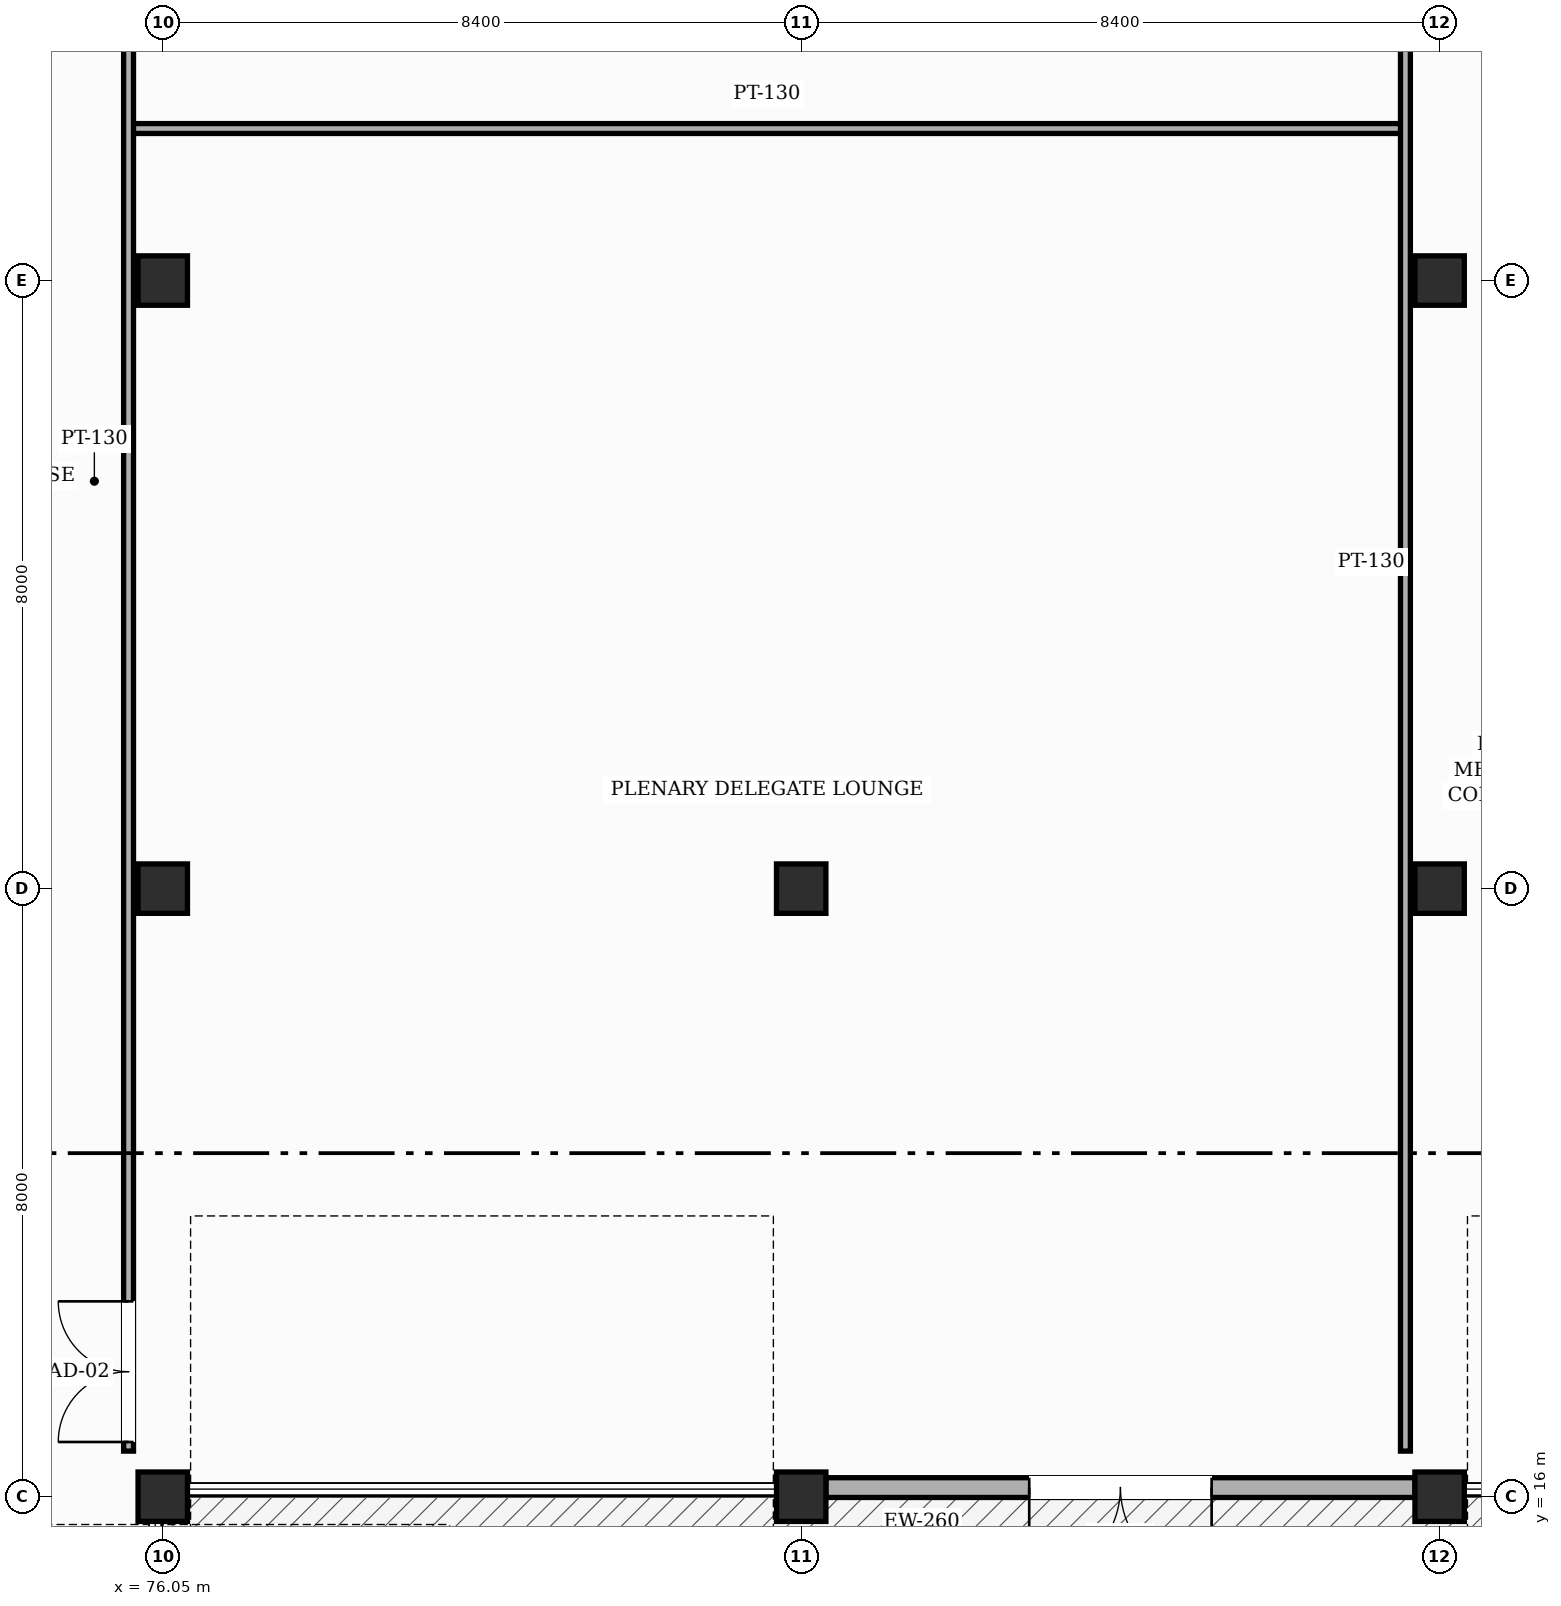
"""IFC4 building model, lengths in metres.
Left out: names, types, materials, properties, quantities, classifications, styles, units other than length and angle.
Written with IfcOpenShell. Run it as: python <this file> out.ifc"""

import sys

from ifc_helpers import new_model, si_unit, direction, frame, frame_2d, origin, origin_2d, place, context, subcontext, project, spatial, rectangle, hollow_rectangle, extrude, element, fill, save


model = new_model("IFC4")
c1 = context("Model", 3, precision=1e-05, world=origin(), true_north=direction((0.0, 1.0)))
c2 = subcontext(c1, "Body", "Model", "MODEL_VIEW")
j1 = project(units=[si_unit("LENGTHUNIT", "METRE"), si_unit("PLANEANGLEUNIT", "RADIAN")], contexts=[c1])
p1 = place(None, origin())
s1 = spatial("IfcSite", under=j1, at=p1, CompositionType="ELEMENT")
p2 = place(p1, origin())
s2 = spatial("IfcBuilding", under=s1, at=p2, CompositionType="ELEMENT")
p3 = place(p2, origin())
s3 = spatial("IfcBuildingStorey", under=s2, at=p3, CompositionType="ELEMENT", Elevation=0.0)
for number, where, z_axis, x_axis in (
    (1, (76.05, 16.0, 0.0), (0.0, 0.0, 1.0), (1.0, 0.0, 0.0)),
    (2, (76.05, 24.0, 0.0), (0.0, 0.0, 1.0), (1.0, 0.0, 0.0)),
    (3, (76.05, 32.0, 0.0), (0.0, 0.0, 1.0), (1.0, 0.0, 0.0)),
    (4, (84.45, 16.0, 0.0), (0.0, 0.0, 1.0), (1.0, 0.0, 0.0)),
    (5, (84.45, 24.0, 0.0), (0.0, 0.0, 1.0), (1.0, 0.0, 0.0)),
    (6, (92.85, 16.0, 0.0), (0.0, 0.0, 1.0), (1.0, 0.0, 0.0)),
    (7, (92.85, 24.0, 0.0), (0.0, 0.0, 1.0), (1.0, 0.0, 0.0)),
    (8, (92.85, 32.0, 0.0), (0.0, 0.0, 1.0), (1.0, 0.0, 0.0)),
):
    element("IfcColumn", number, at=place(p3, frame(where, z_axis=z_axis, x_axis=x_axis)), inside=s3, PredefinedType="COLUMN", context=c2, shape_type="SweptSolid", body=[
        extrude(hollow_rectangle(XDim=0.65, YDim=0.65, WallThickness=0.025, InnerFilletRadius=0.025, OuterFilletRadius=0.05, at=origin_2d()), origin(), (0.0, 0.0, 1.0), 5.4),
    ])
p4 = place(p3, frame((92.525, 16.12, 0.0), z_axis=(0.0, 0.0, 1.0), x_axis=(-1.0, 0.0, 0.0)))
e9 = element("IfcWall", 9, at=p4, inside=s3, PredefinedType="SOLIDWALL", context=c2, shape_type="SweptSolid", body=[
    extrude(rectangle(XDim=7.75, YDim=0.26, at=frame_2d((3.875, 0.0))), origin(), (0.0, 0.0, 1.0), 4.475),
])
p5 = place(p4, frame((2.675, 0.0, 0.0)))
e10 = element("IfcOpeningElement", 10, at=p5, cuts=e9, PredefinedType="OPENING", context=c2, shape_type="SweptSolid", body=[
    extrude(rectangle(XDim=2.4, YDim=2.6, at=frame_2d((1.2, 1.3))), frame((0.0, 0.14, 0.0), z_axis=(0.0, -1.0, 0.0), x_axis=(1.0, 0.0, 0.0)), (0.0, 0.0, 1.0), 0.28),
])
p6 = place(p3, frame((75.6, 34.0, 0.0), z_axis=(0.0, 0.0, 1.0), x_axis=(1.0, 0.0, 0.0)))
e11 = element("IfcWall", 11, at=p6, inside=s3, PredefinedType="PARTITIONING", context=c2, shape_type="SweptSolid", body=[
    extrude(rectangle(XDim=16.8, YDim=0.13, at=frame_2d((8.4, 0.0))), origin(), (0.0, 0.0, 1.0), 5.135),
])
p7 = place(p3, frame((75.6, 16.6, 0.0), z_axis=(0.0, 0.0, 1.0), x_axis=(0.0, 1.0, 0.0)))
e12 = element("IfcWall", 12, at=p7, inside=s3, PredefinedType="PARTITIONING", context=c2, shape_type="SweptSolid", body=[
    extrude(rectangle(XDim=35.8, YDim=0.13, at=frame_2d((17.9, 0.0))), origin(), (0.0, 0.0, 1.0), 5.135),
])
p8 = place(p7, frame((0.12, 0.0, 0.0)))
e13 = element("IfcOpeningElement", 13, at=p8, cuts=e12, PredefinedType="OPENING", context=c2, shape_type="SweptSolid", body=[
    extrude(rectangle(XDim=1.85, YDim=2.4, at=frame_2d((0.925, 1.2))), frame((0.0, 0.075, 0.0), z_axis=(0.0, -1.0, 0.0), x_axis=(1.0, 0.0, 0.0)), (0.0, 0.0, 1.0), 0.15),
])
p9 = place(p7, frame((25.675, 0.0, 0.0)))
e14 = element("IfcOpeningElement", 14, at=p9, cuts=e12, PredefinedType="OPENING", context=c2, shape_type="SweptSolid", body=[
    extrude(rectangle(XDim=1.85, YDim=2.4, at=frame_2d((0.925, 1.2))), frame((0.0, 0.075, 0.0), z_axis=(0.0, -1.0, 0.0), x_axis=(1.0, 0.0, 0.0)), (0.0, 0.0, 1.0), 0.15),
])
p10 = place(p3, frame((92.4, 16.6, 0.0), z_axis=(0.0, 0.0, 1.0), x_axis=(0.0, 1.0, 0.0)))
e15 = element("IfcWall", 15, at=p10, inside=s3, PredefinedType="PARTITIONING", context=c2, shape_type="SweptSolid", body=[
    extrude(rectangle(XDim=35.8, YDim=0.13, at=frame_2d((17.9, 0.0))), origin(), (0.0, 0.0, 1.0), 5.135),
])
p11 = place(p5, origin())
e16 = element("IfcDoor", 16, at=p11, inside=s3, OperationType="DOUBLE_DOOR_SINGLE_SWING", PredefinedType="DOOR", context=c2, shape_type="SweptSolid", body=[
    extrude(rectangle(XDim=2.4, YDim=2.6, at=frame_2d((1.2, 1.3))), frame((0.0, 0.025, 0.0), z_axis=(0.0, -1.0, 0.0), x_axis=(1.0, 0.0, 0.0)), (0.0, 0.0, 1.0), 0.05),
])
fill(e10, e16)
p12 = place(p8, origin())
e17 = element("IfcDoor", 17, at=p12, inside=s3, OperationType="DOUBLE_DOOR_SINGLE_SWING", PredefinedType="DOOR", context=c2, shape_type="SweptSolid", body=[
    extrude(rectangle(XDim=1.85, YDim=2.4, at=frame_2d((0.925, 1.2))), frame((0.0, 0.025, 0.0), z_axis=(0.0, -1.0, 0.0), x_axis=(1.0, 0.0, 0.0)), (0.0, 0.0, 1.0), 0.05),
])
fill(e13, e17)
save(model, sys.argv[1])
